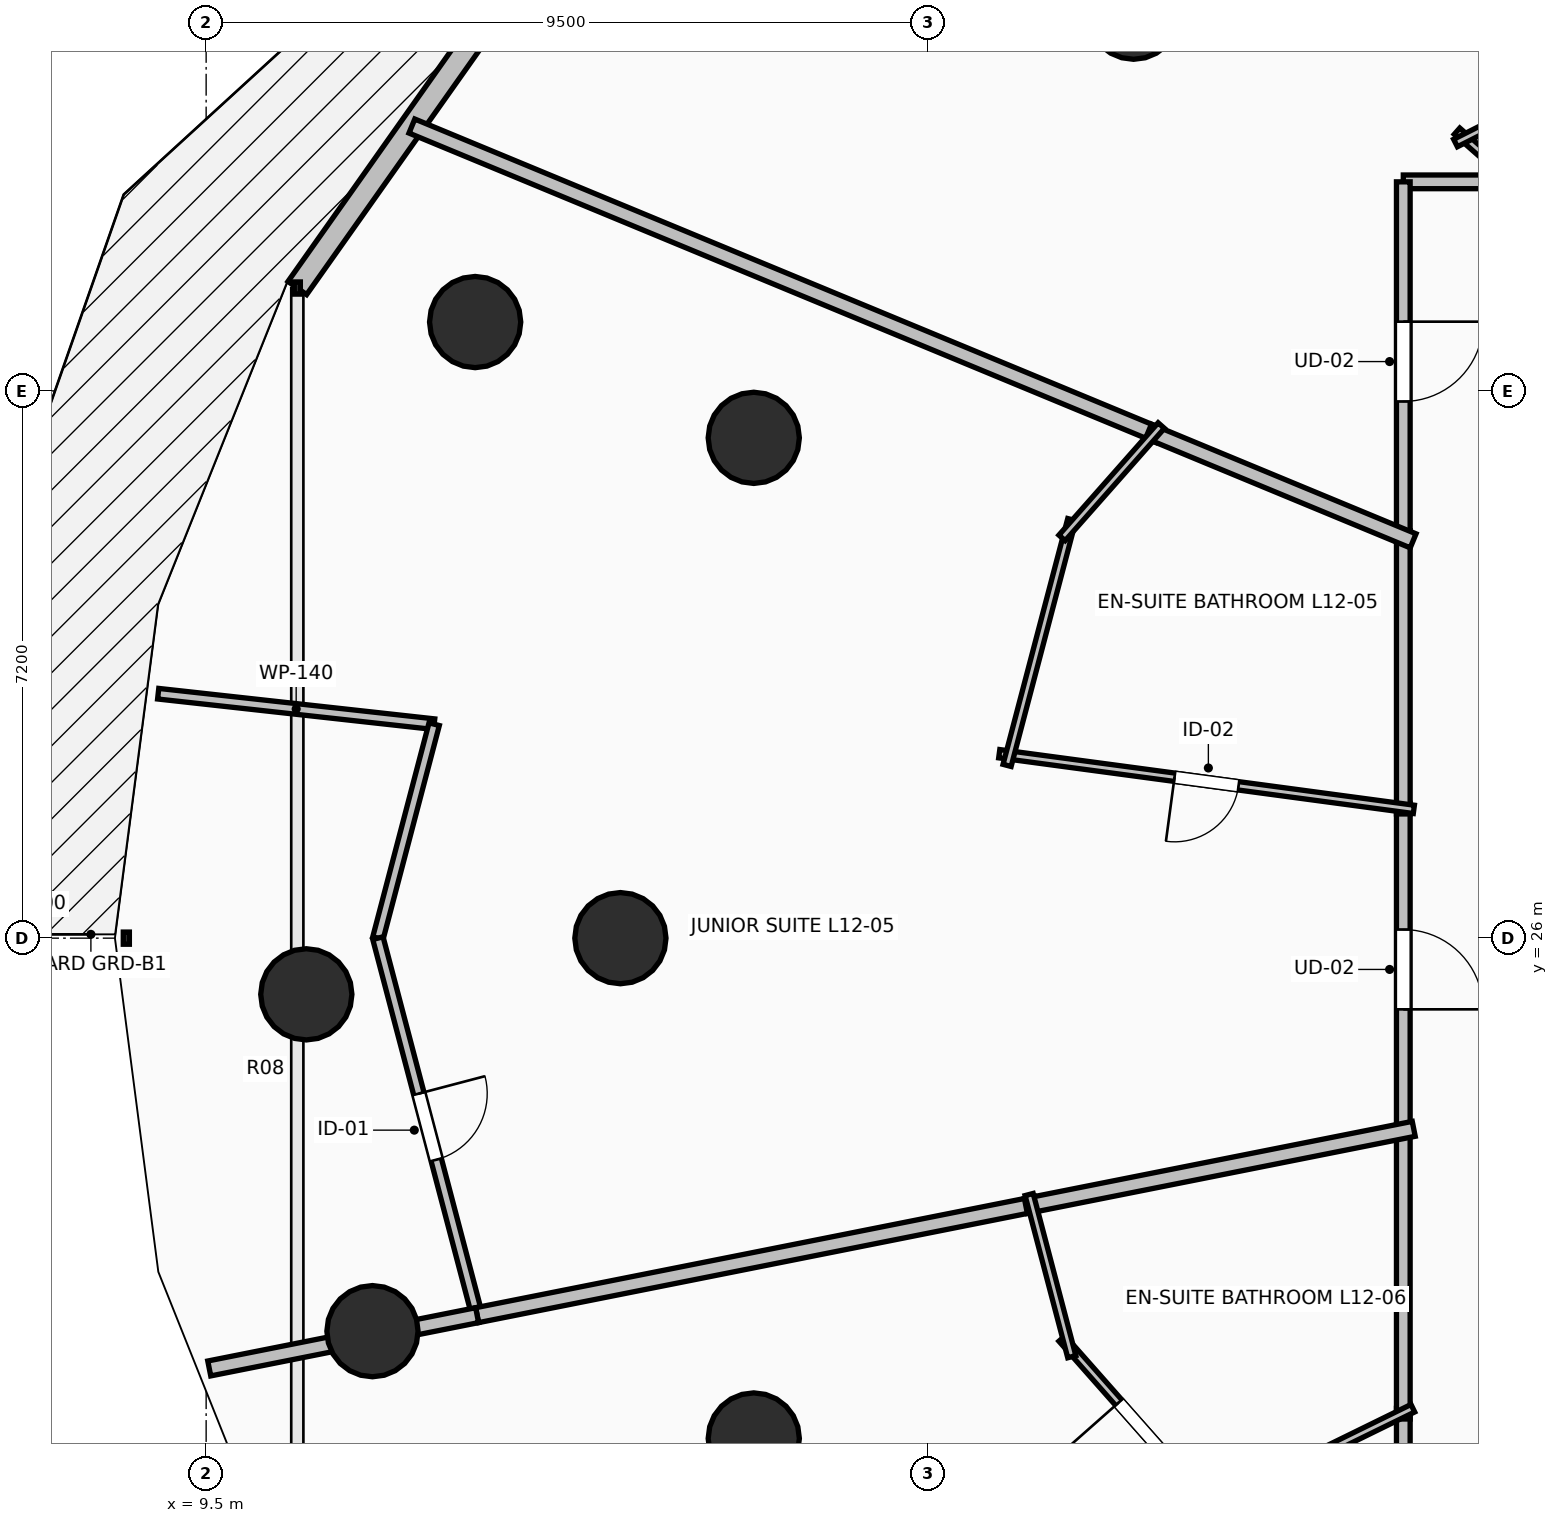
"""IFC4 building model, lengths in metres.
Left out: names, types, materials, properties, quantities, classifications, styles, units other than length and angle.
Written with IfcOpenShell. Run it as: python <this file> out.ifc"""

import sys

from ifc_helpers import new_model, si_unit, direction, frame, frame_2d, origin, origin_2d, place, context, subcontext, project, spatial, rectangle, circle, extrude, element, fill, save


model = new_model("IFC4")
c1 = context("Model", 3, precision=1e-05, world=origin(), true_north=direction((0.0, 1.0)))
c2 = subcontext(c1, "Body", "Model", "MODEL_VIEW")
j1 = project(units=[si_unit("LENGTHUNIT", "METRE"), si_unit("PLANEANGLEUNIT", "RADIAN")], contexts=[c1])
p1 = place(None, origin())
s1 = spatial("IfcSite", under=j1, at=p1, CompositionType="ELEMENT")
p2 = place(p1, origin())
s2 = spatial("IfcBuilding", under=s1, at=p2, CompositionType="ELEMENT")
p3 = place(p2, frame((0.0, 0.0, 48.5)))
s3 = spatial("IfcBuildingStorey", under=s2, at=p3, CompositionType="ELEMENT", Elevation=48.5)
for number, where, z_axis, x_axis in (
    (1, (21.701, 38.162, 0.0), (0.0, 0.0, 1.0), (-0.707, 0.707, 0.0)),
    (2, (16.705, 32.582, 0.0), (0.0, 0.0, 1.0), (-0.924, 0.383, 0.0)),
    (3, (14.95, 26.0, 0.0), (0.0, 0.0, 1.0), (-1.0, 0.0, 0.0)),
    (4, (16.705, 19.418, 0.0), (0.0, 0.0, 1.0), (-0.924, -0.383, 0.0)),
    (5, (13.039, 34.105, 0.0), (0.0, 0.0, 1.0), (-0.924, 0.383, 0.0)),
    (6, (10.818, 25.261, 0.0), (0.0, 0.0, 1.0), (-1.0, 0.0, 0.0)),
    (7, (11.688, 20.83, 0.0), (0.0, 0.0, 1.0), (-0.924, -0.383, 0.0)),
):
    element("IfcColumn", number, at=place(p3, frame(where, z_axis=z_axis, x_axis=x_axis)), inside=s3, PredefinedType="COLUMN", context=c2, shape_type="SweptSolid", body=[
        extrude(circle(Radius=0.6, at=origin_2d()), origin(), (0.0, 0.0, 1.0), 3.5),
    ])
p4 = place(p3, frame((13.43, 38.417, 0.0), z_axis=(0.0, 0.0, 1.0), x_axis=(-0.577130815624, -0.816651713803, 0.0)))
e8 = element("IfcWall", 8, at=p4, inside=s3, PredefinedType="STANDARD", context=c2, shape_type="SweptSolid", body=[
    extrude(rectangle(XDim=4.731, YDim=0.3, at=frame_2d((2.366, 0.0))), origin(), (0.0, 0.0, 1.0), 3.24),
])
p5 = place(p3, frame((26.774, 35.95, 0.0), z_axis=(0.0, 0.0, 1.0), x_axis=(-1.0, 0.0, 0.0)))
e9 = element("IfcWall", 9, at=p5, inside=s3, PredefinedType="PARTITIONING", context=c2, shape_type="SweptSolid", body=[
    extrude(rectangle(XDim=1.524, YDim=0.18, at=frame_2d((0.762, 0.0))), origin(), (0.0, 0.0, 1.0), 2.886),
])
p6 = place(p3, frame((25.25, 35.95, 0.0), z_axis=(0.0, 0.0, 1.0), x_axis=(0.0, -1.0, 0.0)))
e10 = element("IfcWall", 10, at=p6, inside=s3, PredefinedType="PARTITIONING", context=c2, shape_type="SweptSolid", body=[
    extrude(rectangle(XDim=4.729, YDim=0.18, at=frame_2d((2.365, 0.0))), origin(), (0.0, 0.0, 1.0), 2.432),
])
p7 = place(p6, frame((1.84, 0.0, 0.0)))
e11 = element("IfcOpeningElement", 11, at=p7, cuts=e10, PredefinedType="OPENING", context=c2, shape_type="SweptSolid", body=[
    extrude(rectangle(XDim=1.05, YDim=2.2, at=frame_2d((0.525, 1.1))), frame((0.0, 0.105, 0.0), z_axis=(0.0, -1.0, 0.0), x_axis=(1.0, 0.0, 0.0)), (0.0, 0.0, 1.0), 0.21),
])
p8 = place(p3, frame((25.25, 27.774, 0.0), z_axis=(0.0, 0.0, 1.0), x_axis=(0.0, -1.0, 0.0)))
e12 = element("IfcWall", 12, at=p8, inside=s3, PredefinedType="PARTITIONING", context=c2, shape_type="SweptSolid", body=[
    extrude(rectangle(XDim=4.371, YDim=0.18, at=frame_2d((2.186, 0.0))), origin(), (0.0, 0.0, 1.0), 2.432),
])
p9 = place(p8, frame((1.66, 0.0, 0.0)))
e13 = element("IfcOpeningElement", 13, at=p9, cuts=e12, PredefinedType="OPENING", context=c2, shape_type="SweptSolid", body=[
    extrude(rectangle(XDim=1.05, YDim=2.2, at=frame_2d((0.525, 1.1))), frame((0.0, 0.105, 0.0), z_axis=(0.0, -1.0, 0.0), x_axis=(1.0, 0.0, 0.0)), (0.0, 0.0, 1.0), 0.21),
])
p10 = place(p3, frame((25.25, 31.361, 0.0), z_axis=(0.0, 0.0, 1.0), x_axis=(0.0, -1.0, 0.0)))
e14 = element("IfcWall", 14, at=p10, inside=s3, PredefinedType="PARTITIONING", context=c2, shape_type="SweptSolid", body=[
    extrude(rectangle(XDim=3.727, YDim=0.18, at=frame_2d((1.864, 0.0))), origin(), (0.0, 0.0, 1.0), 2.432),
])
p11 = place(p3, frame((25.25, 19.814, 0.0), z_axis=(0.0, 0.0, 1.0), x_axis=(0.0, -1.0, 0.0)))
e15 = element("IfcWall", 15, at=p11, inside=s3, PredefinedType="PARTITIONING", context=c2, shape_type="SweptSolid", body=[
    extrude(rectangle(XDim=5.714, YDim=0.18, at=frame_2d((2.857, 0.0))), origin(), (0.0, 0.0, 1.0), 2.432),
])
p12 = place(p11, frame((2.332, 0.0, 0.0)))
e16 = element("IfcOpeningElement", 16, at=p12, cuts=e15, PredefinedType="OPENING", context=c2, shape_type="SweptSolid", body=[
    extrude(rectangle(XDim=1.05, YDim=2.2, at=frame_2d((0.525, 1.1))), frame((0.0, 0.105, 0.0), z_axis=(0.0, -1.0, 0.0), x_axis=(1.0, 0.0, 0.0)), (0.0, 0.0, 1.0), 0.21),
])
p13 = place(p3, frame((25.25, 23.543, 0.0), z_axis=(0.0, 0.0, 1.0), x_axis=(0.0, -1.0, 0.0)))
e17 = element("IfcWall", 17, at=p13, inside=s3, PredefinedType="PARTITIONING", context=c2, shape_type="SweptSolid", body=[
    extrude(rectangle(XDim=3.869, YDim=0.18, at=frame_2d((1.935, 0.0))), origin(), (0.0, 0.0, 1.0), 3.24),
])
p14 = place(p3, frame((26.819, 35.857, 0.0), z_axis=(0.0, 0.0, 1.0), x_axis=(-0.750624975639, 0.660728496394, 0.0)))
e18 = element("IfcWall", 18, at=p14, inside=s3, PredefinedType="PARTITIONING", context=c2, shape_type="SweptSolid", body=[
    extrude(rectangle(XDim=1.149, YDim=0.11, at=frame_2d((0.574, 0.0))), origin(), (0.0, 0.0, 1.0), 2.886),
])
p15 = place(p3, frame((25.937, 36.461, 0.0), z_axis=(0.0, 0.0, 1.0), x_axis=(0.892461080662, 0.451124394711, 0.0)))
e19 = element("IfcWall", 19, at=p15, inside=s3, PredefinedType="PARTITIONING", context=c2, shape_type="SweptSolid", body=[
    extrude(rectangle(XDim=4.39, YDim=0.11, at=frame_2d((2.195, 0.0))), origin(), (0.0, 0.0, 1.0), 2.432),
])
p16 = place(p15, frame((1.77, 0.0, 0.0)))
e20 = element("IfcOpeningElement", 20, at=p16, cuts=e19, PredefinedType="OPENING", context=c2, shape_type="SweptSolid", body=[
    extrude(rectangle(XDim=0.85, YDim=2.1, at=frame_2d((0.425, 1.05))), frame((0.0, 0.07, 0.0), z_axis=(0.0, -1.0, 0.0), x_axis=(1.0, 0.0, 0.0)), (0.0, 0.0, 1.0), 0.14),
])
p17 = place(p3, frame((12.207, 36.684, 0.0), z_axis=(0.0, 0.0, 1.0), x_axis=(0.923876032578, -0.382691881842, 0.0)))
e21 = element("IfcWall", 21, at=p17, inside=s3, PredefinedType="PARTITIONING", context=c2, shape_type="SweptSolid", body=[
    extrude(rectangle(XDim=10.63, YDim=0.2, at=frame_2d((5.315, 0.0))), origin(), (0.0, 0.0, 1.0), 2.624),
])
p18 = place(p3, frame((21.899, 32.669, 0.0), z_axis=(0.0, 0.0, 1.0), x_axis=(0.923843852071, -0.382769561211, 0.0)))
e22 = element("IfcWall", 22, at=p18, inside=s3, PredefinedType="PARTITIONING", context=c2, shape_type="SweptSolid", body=[
    extrude(rectangle(XDim=3.768, YDim=0.2, at=frame_2d((1.884, 0.0))), origin(), (0.0, 0.0, 1.0), 2.886),
])
p19 = place(p3, frame((25.389, 27.694, 0.0), z_axis=(0.0, 0.0, 1.0), x_axis=(-0.991111683087, 0.133032445848, 0.0)))
e23 = element("IfcWall", 23, at=p19, inside=s3, PredefinedType="PARTITIONING", context=c2, shape_type="SweptSolid", body=[
    extrude(rectangle(XDim=5.504, YDim=0.11, at=frame_2d((2.752, 0.0))), origin(), (0.0, 0.0, 1.0), 2.432),
])
p20 = place(p19, frame((2.327, 0.0, 0.0)))
e24 = element("IfcOpeningElement", 24, at=p20, cuts=e23, PredefinedType="OPENING", context=c2, shape_type="SweptSolid", body=[
    extrude(rectangle(XDim=0.85, YDim=2.1, at=frame_2d((0.425, 1.05))), frame((0.0, 0.07, 0.0), z_axis=(0.0, -1.0, 0.0), x_axis=(1.0, 0.0, 0.0)), (0.0, 0.0, 1.0), 0.14),
])
p21 = place(p3, frame((20.037, 28.273, 0.0), z_axis=(0.0, 0.0, 1.0), x_axis=(0.254593926267, 0.967048050878, 0.0)))
e25 = element("IfcWall", 25, at=p21, inside=s3, PredefinedType="PARTITIONING", context=c2, shape_type="SweptSolid", body=[
    extrude(rectangle(XDim=3.344, YDim=0.11, at=frame_2d((1.672, 0.0))), origin(), (0.0, 0.0, 1.0), 2.432),
])
p22 = place(p3, frame((20.76, 31.266, 0.0), z_axis=(0.0, 0.0, 1.0), x_axis=(0.662047420969, 0.749461948593, 0.0)))
e26 = element("IfcWall", 26, at=p22, inside=s3, PredefinedType="PARTITIONING", context=c2, shape_type="SweptSolid", body=[
    extrude(rectangle(XDim=1.972, YDim=0.11, at=frame_2d((0.986, 0.0))), origin(), (0.0, 0.0, 1.0), 3.24),
])
p23 = place(p3, frame((8.869, 29.216, 0.0), z_axis=(0.0, 0.0, 1.0), x_axis=(0.99395362386, -0.109800699523, 0.0)))
e27 = element("IfcWall", 27, at=p23, inside=s3, PredefinedType="PARTITIONING", context=c2, shape_type="SweptSolid", body=[
    extrude(rectangle(XDim=3.653, YDim=0.14, at=frame_2d((1.827, 0.0))), origin(), (0.0, 0.0, 1.0), 2.624),
])
p24 = place(p3, frame((12.5, 28.815, 0.0), z_axis=(0.0, 0.0, 1.0), x_axis=(-0.254241432202, -0.967140783005, 0.0)))
e28 = element("IfcWall", 28, at=p24, inside=s3, PredefinedType="PARTITIONING", context=c2, shape_type="SweptSolid", body=[
    extrude(rectangle(XDim=2.911, YDim=0.14, at=frame_2d((1.455, 0.0))), origin(), (0.0, 0.0, 1.0), 3.24),
])
p25 = place(p3, frame((11.76, 26.0, 0.0), z_axis=(0.0, 0.0, 1.0), x_axis=(0.254434720755, -0.967089950767, 0.0)))
e29 = element("IfcWall", 29, at=p25, inside=s3, PredefinedType="PARTITIONING", context=c2, shape_type="SweptSolid", body=[
    extrude(rectangle(XDim=5.129, YDim=0.14, at=frame_2d((2.564, 0.0))), origin(), (0.0, 0.0, 1.0), 2.432),
])
p26 = place(p25, frame((2.115, 0.0, 0.0)))
e30 = element("IfcOpeningElement", 30, at=p26, cuts=e29, PredefinedType="OPENING", context=c2, shape_type="SweptSolid", body=[
    extrude(rectangle(XDim=0.9, YDim=2.1, at=frame_2d((0.45, 1.05))), frame((0.0, 0.085, 0.0), z_axis=(0.0, -1.0, 0.0), x_axis=(1.0, 0.0, 0.0)), (0.0, 0.0, 1.0), 0.17),
])
p27 = place(p3, frame((13.065, 21.04, 0.0), z_axis=(0.0, 0.0, 1.0), x_axis=(0.980774220135, 0.195145917502, 0.0)))
e31 = element("IfcWall", 31, at=p27, inside=s3, PredefinedType="PARTITIONING", context=c2, shape_type="SweptSolid", body=[
    extrude(rectangle(XDim=7.501, YDim=0.2, at=frame_2d((3.751, 0.0))), origin(), (0.0, 0.0, 1.0), 2.972),
])
p28 = place(p3, frame((20.285, 22.476, 0.0), z_axis=(0.0, 0.0, 1.0), x_axis=(0.980785905074, 0.195087181559, 0.0)))
e32 = element("IfcWall", 32, at=p28, inside=s3, PredefinedType="PARTITIONING", context=c2, shape_type="SweptSolid", body=[
    extrude(rectangle(XDim=5.202, YDim=0.2, at=frame_2d((2.601, 0.0))), origin(), (0.0, 0.0, 1.0), 2.886),
])
p29 = place(p3, frame((9.541, 20.339, 0.0), z_axis=(0.0, 0.0, 1.0), x_axis=(0.980786594985, 0.195083713053, 0.0)))
e33 = element("IfcWall", 33, at=p29, inside=s3, PredefinedType="PARTITIONING", context=c2, shape_type="SweptSolid", body=[
    extrude(rectangle(XDim=3.593, YDim=0.2, at=frame_2d((1.796, 0.0))), origin(), (0.0, 0.0, 1.0), 2.432),
])
p30 = place(p3, frame((25.376, 19.816, 0.0), z_axis=(0.0, 0.0, 1.0), x_axis=(-0.89800930559, -0.439976461954, 0.0)))
e34 = element("IfcWall", 34, at=p30, inside=s3, PredefinedType="PARTITIONING", context=c2, shape_type="SweptSolid", body=[
    extrude(rectangle(XDim=3.096, YDim=0.11, at=frame_2d((1.548, 0.0))), origin(), (0.0, 0.0, 1.0), 3.24),
])
p31 = place(p3, frame((22.814, 18.41, 0.0), z_axis=(0.0, 0.0, 1.0), x_axis=(-0.662186487972, 0.749339078887, 0.0)))
e35 = element("IfcWall", 35, at=p31, inside=s3, PredefinedType="PARTITIONING", context=c2, shape_type="SweptSolid", body=[
    extrude(rectangle(XDim=3.101, YDim=0.11, at=frame_2d((1.551, 0.0))), origin(), (0.0, 0.0, 1.0), 2.886),
])
p32 = place(p31, frame((1.125, 0.0, 0.0)))
e36 = element("IfcOpeningElement", 36, at=p32, cuts=e35, PredefinedType="OPENING", context=c2, shape_type="SweptSolid", body=[
    extrude(rectangle(XDim=0.85, YDim=2.1, at=frame_2d((0.425, 1.05))), frame((0.0, 0.07, 0.0), z_axis=(0.0, -1.0, 0.0), x_axis=(1.0, 0.0, 0.0)), (0.0, 0.0, 1.0), 0.14),
])
p33 = place(p3, frame((20.889, 20.494, 0.0), z_axis=(0.0, 0.0, 1.0), x_axis=(-0.254389812051, 0.967101764823, 0.0)))
e37 = element("IfcWall", 37, at=p33, inside=s3, PredefinedType="PARTITIONING", context=c2, shape_type="SweptSolid", body=[
    extrude(rectangle(XDim=2.206, YDim=0.11, at=frame_2d((1.103, 0.0))), origin(), (0.0, 0.0, 1.0), 3.24),
])
p34 = place(p7, origin())
e38 = element("IfcDoor", 38, at=p34, inside=s3, OperationType="SINGLE_SWING_LEFT", PredefinedType="DOOR", context=c2, shape_type="SweptSolid", body=[
    extrude(rectangle(XDim=1.05, YDim=2.2, at=frame_2d((0.525, 1.1))), frame((0.0, 0.025, 0.0), z_axis=(0.0, -1.0, 0.0), x_axis=(1.0, 0.0, 0.0)), (0.0, 0.0, 1.0), 0.05),
])
fill(e11, e38)
p35 = place(p9, origin())
e39 = element("IfcDoor", 39, at=p35, inside=s3, OperationType="SINGLE_SWING_RIGHT", PredefinedType="DOOR", context=c2, shape_type="SweptSolid", body=[
    extrude(rectangle(XDim=1.05, YDim=2.2, at=frame_2d((0.525, 1.1))), frame((0.0, 0.025, 0.0), z_axis=(0.0, -1.0, 0.0), x_axis=(1.0, 0.0, 0.0)), (0.0, 0.0, 1.0), 0.05),
])
fill(e13, e39)
p36 = place(p20, origin())
e40 = element("IfcDoor", 40, at=p36, inside=s3, OperationType="SINGLE_SWING_RIGHT", PredefinedType="DOOR", context=c2, shape_type="SweptSolid", body=[
    extrude(rectangle(XDim=0.85, YDim=2.1, at=frame_2d((0.425, 1.05))), frame((0.0, 0.025, 0.0), z_axis=(0.0, -1.0, 0.0), x_axis=(1.0, 0.0, 0.0)), (0.0, 0.0, 1.0), 0.05),
])
fill(e24, e40)
p37 = place(p26, origin())
e41 = element("IfcDoor", 41, at=p37, inside=s3, OperationType="SINGLE_SWING_LEFT", PredefinedType="DOOR", context=c2, shape_type="SweptSolid", body=[
    extrude(rectangle(XDim=0.9, YDim=2.1, at=frame_2d((0.45, 1.05))), frame((0.0, 0.025, 0.0), z_axis=(0.0, -1.0, 0.0), x_axis=(1.0, 0.0, 0.0)), (0.0, 0.0, 1.0), 0.05),
])
fill(e30, e41)
p38 = place(p32, origin())
e42 = element("IfcDoor", 42, at=p38, inside=s3, OperationType="SINGLE_SWING_RIGHT", PredefinedType="DOOR", context=c2, shape_type="SweptSolid", body=[
    extrude(rectangle(XDim=0.85, YDim=2.1, at=frame_2d((0.425, 1.05))), frame((0.0, 0.025, 0.0), z_axis=(0.0, -1.0, 0.0), x_axis=(1.0, 0.0, 0.0)), (0.0, 0.0, 1.0), 0.05),
])
fill(e36, e42)
save(model, sys.argv[1])
